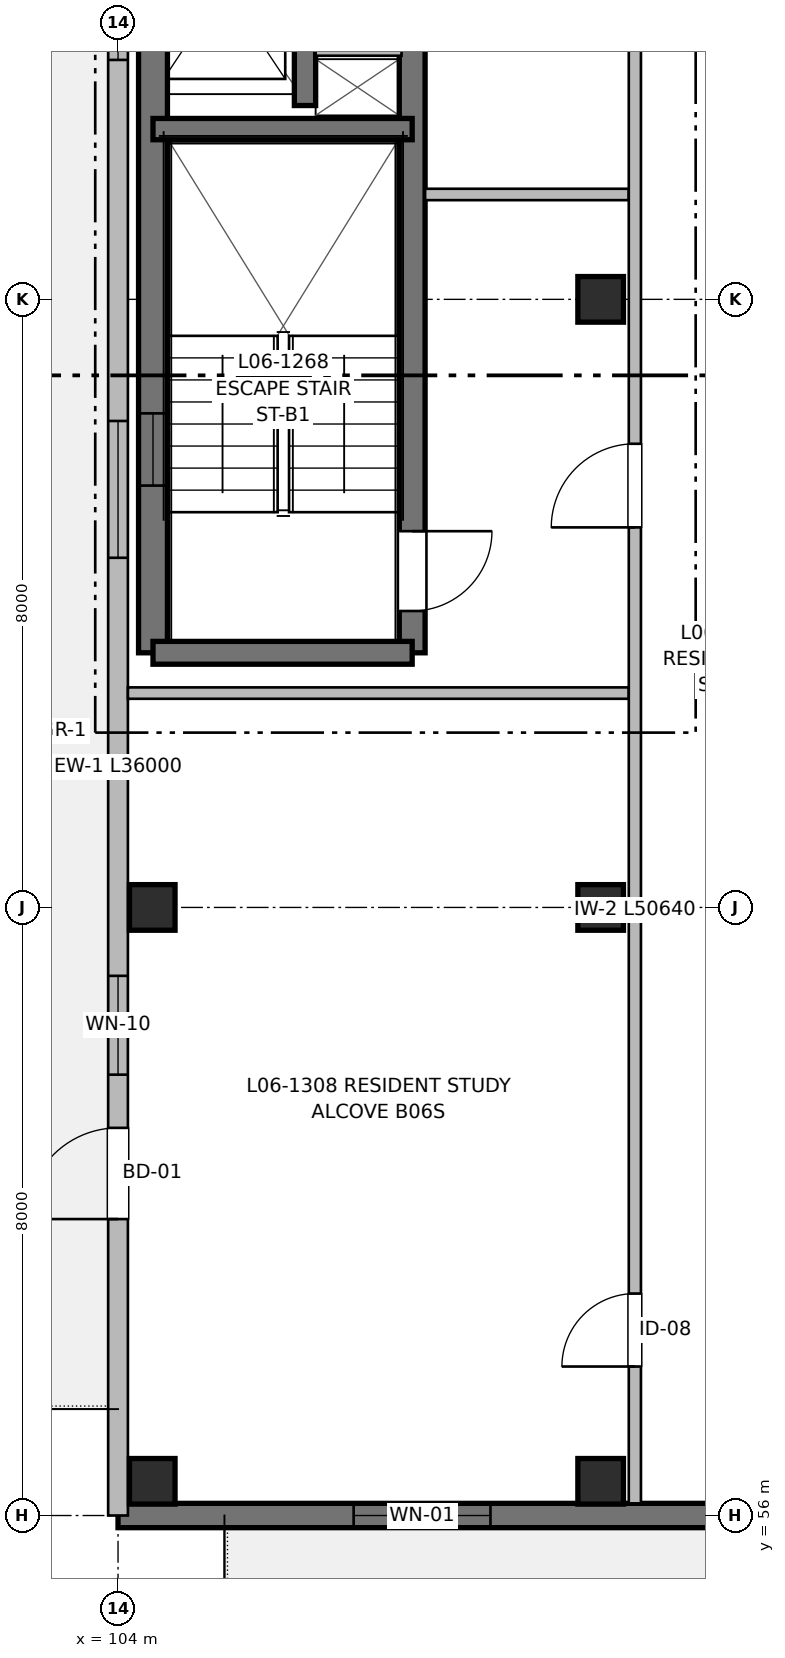
"""IFC4 building model, lengths in metres.
Left out: names, types, materials, properties, quantities, classifications, styles, units other than length and angle.
Written with IfcOpenShell. Run it as: python <this file> out.ifc"""

import sys

from ifc_helpers import new_model, si_unit, direction, frame, frame_2d, origin, origin_2d, place, context, subcontext, project, spatial, rectangle, extrude, element, fill, save


model = new_model("IFC4")
c1 = context("Model", 3, precision=1e-05, world=origin(), true_north=direction((0.0, 1.0)))
c2 = subcontext(c1, "Body", "Model", "MODEL_VIEW")
j1 = project(units=[si_unit("LENGTHUNIT", "METRE"), si_unit("PLANEANGLEUNIT", "RADIAN")], contexts=[c1])
p1 = place(None, origin())
s1 = spatial("IfcSite", under=j1, at=p1, CompositionType="ELEMENT")
p2 = place(p1, origin())
s2 = spatial("IfcBuilding", under=s1, at=p2, CompositionType="ELEMENT")
p3 = place(p2, frame((0.0, 0.0, 20.16)))
s3 = spatial("IfcBuildingStorey", under=s2, at=p3, CompositionType="ELEMENT", Elevation=20.16)
for number, where, z_axis, x_axis in (
    (1, (104.45, 56.45, 0.0), (0.0, 0.0, 1.0), (1.0, 0.0, 0.0)),
    (2, (104.45, 64.0, 0.0), (0.0, 0.0, 1.0), (1.0, 0.0, 0.0)),
    (3, (110.35, 56.45, 0.0), (0.0, 0.0, 1.0), (1.0, 0.0, 0.0)),
    (4, (110.35, 64.0, 0.0), (0.0, 0.0, 1.0), (1.0, 0.0, 0.0)),
    (5, (110.35, 72.0, 0.0), (0.0, 0.0, 1.0), (1.0, 0.0, 0.0)),
):
    element("IfcColumn", number, at=place(p3, frame(where, z_axis=z_axis, x_axis=x_axis)), inside=s3, PredefinedType="COLUMN", context=c2, shape_type="SweptSolid", body=[
        extrude(rectangle(XDim=0.6, YDim=0.6, at=origin_2d()), origin(), (0.0, 0.0, 1.0), 3.2),
    ])
p4 = place(p3, frame((104.46, 67.35, 0.0), z_axis=(0.0, 0.0, 1.0), x_axis=(0.0, 1.0, 0.0)))
e6 = element("IfcWall", 6, at=p4, inside=s3, PredefinedType="SHEAR", context=c2, shape_type="SweptSolid", body=[
    extrude(rectangle(XDim=12.45, YDim=0.38, at=frame_2d((6.225, 0.0))), origin(), (0.0, 0.0, 1.0), 3.2),
])
p5 = place(p4, frame((2.2, 0.0, 0.97)))
e7 = element("IfcOpeningElement", 7, at=p5, cuts=e6, PredefinedType="OPENING", context=c2, shape_type="SweptSolid", body=[
    extrude(rectangle(XDim=0.95, YDim=1.25, at=frame_2d((0.475, 0.625))), frame((0.0, 0.2, 0.0), z_axis=(0.0, -1.0, 0.0), x_axis=(1.0, 0.0, 0.0)), (0.0, 0.0, 1.0), 0.4),
])
p6 = place(p3, frame((107.87, 79.8, 0.0), z_axis=(0.0, 0.0, 1.0), x_axis=(0.0, -1.0, 0.0)))
e8 = element("IfcWall", 8, at=p6, inside=s3, PredefinedType="SHEAR", context=c2, shape_type="SweptSolid", body=[
    extrude(rectangle(XDim=12.45, YDim=0.34, at=frame_2d((6.225, 0.0))), origin(), (0.0, 0.0, 1.0), 3.2),
])
p7 = place(p6, frame((10.85, 0.0, 0.0)))
e9 = element("IfcOpeningElement", 9, at=p7, cuts=e8, PredefinedType="OPENING", context=c2, shape_type="SweptSolid", body=[
    extrude(rectangle(XDim=1.05, YDim=2.15, at=frame_2d((0.525, 1.075))), frame((0.0, 0.18, 0.0), z_axis=(0.0, -1.0, 0.0), x_axis=(1.0, 0.0, 0.0)), (0.0, 0.0, 1.0), 0.36),
])
p8 = place(p3, frame((107.87, 67.35, 0.0), z_axis=(0.0, 0.0, 1.0), x_axis=(-1.0, 0.0, 0.0)))
e10 = element("IfcWall", 10, at=p8, inside=s3, PredefinedType="SHEAR", context=c2, shape_type="SweptSolid", body=[
    extrude(rectangle(XDim=3.41, YDim=0.3, at=frame_2d((1.705, 0.0))), origin(), (0.0, 0.0, 1.0), 3.2),
])
p9 = place(p3, frame((104.46, 74.24, 0.0), z_axis=(0.0, 0.0, 1.0), x_axis=(1.0, 0.0, 0.0)))
e11 = element("IfcWall", 11, at=p9, inside=s3, PredefinedType="SHEAR", context=c2, shape_type="SweptSolid", body=[
    extrude(rectangle(XDim=3.41, YDim=0.28, at=frame_2d((1.705, 0.0))), origin(), (0.0, 0.0, 1.0), 3.2),
])
p10 = place(p3, frame((106.46, 74.55, 0.0), z_axis=(0.0, 0.0, 1.0), x_axis=(0.0, 1.0, 0.0)))
e12 = element("IfcWall", 12, at=p10, inside=s3, PredefinedType="SHEAR", context=c2, shape_type="SweptSolid", body=[
    extrude(rectangle(XDim=5.25, YDim=0.28, at=frame_2d((2.625, 0.0))), origin(), (0.0, 0.0, 1.0), 3.2),
])
p11 = place(p10, frame((1.15, 0.0, 0.0)))
e13 = element("IfcOpeningElement", 13, at=p11, cuts=e12, PredefinedType="OPENING", context=c2, shape_type="SweptSolid", body=[
    extrude(rectangle(XDim=1.0, YDim=2.15, at=frame_2d((0.5, 1.075))), frame((0.0, 0.15, 0.0), z_axis=(0.0, -1.0, 0.0), x_axis=(1.0, 0.0, 0.0)), (0.0, 0.0, 1.0), 0.3),
])
p12 = place(p10, frame((3.85, 0.0, 0.0)))
e14 = element("IfcOpeningElement", 14, at=p12, cuts=e12, PredefinedType="OPENING", context=c2, shape_type="SweptSolid", body=[
    extrude(rectangle(XDim=0.9, YDim=2.15, at=frame_2d((0.45, 1.075))), frame((0.0, 0.15, 0.0), z_axis=(0.0, -1.0, 0.0), x_axis=(1.0, 0.0, 0.0)), (0.0, 0.0, 1.0), 0.3),
])
p13 = place(p3, frame((106.6, 75.28, 0.0), z_axis=(0.0, 0.0, 1.0), x_axis=(1.0, 0.0, 0.0)))
e15 = element("IfcWall", 15, at=p13, inside=s3, PredefinedType="PARTITIONING", context=c2, shape_type="SweptSolid", body=[
    extrude(rectangle(XDim=1.13, YDim=0.15, at=frame_2d((0.565, 0.0))), origin(), (0.0, 0.0, 1.0), 2.95),
])
p14 = place(p3, frame((120.0, 56.0, 0.0), z_axis=(0.0, 0.0, 1.0), x_axis=(-1.0, 0.0, 0.0)))
e16 = element("IfcWall", 16, at=p14, inside=s3, PredefinedType="SHEAR", context=c2, shape_type="SweptSolid", body=[
    extrude(rectangle(XDim=16.0, YDim=0.32, at=frame_2d((8.0, 0.0))), origin(), (0.0, 0.0, 1.0), 2.98),
])
p15 = place(p14, frame((2.55, 0.0, 0.0)))
e17 = element("IfcOpeningElement", 17, at=p15, cuts=e16, PredefinedType="OPENING", context=c2, shape_type="SweptSolid", body=[
    extrude(rectangle(XDim=1.2, YDim=2.2, at=frame_2d((0.6, 1.1))), frame((0.0, 0.17, 0.0), z_axis=(0.0, -1.0, 0.0), x_axis=(1.0, 0.0, 0.0)), (0.0, 0.0, 1.0), 0.34),
])
p16 = place(p14, frame((5.3, 0.0, 0.82)))
e18 = element("IfcOpeningElement", 18, at=p16, cuts=e16, PredefinedType="OPENING", context=c2, shape_type="SweptSolid", body=[
    extrude(rectangle(XDim=1.3, YDim=1.4, at=frame_2d((0.65, 0.7))), frame((0.0, 0.17, 0.0), z_axis=(0.0, -1.0, 0.0), x_axis=(1.0, 0.0, 0.0)), (0.0, 0.0, 1.0), 0.34),
])
p17 = place(p14, frame((11.1, 0.0, 0.72)))
e19 = element("IfcOpeningElement", 19, at=p17, cuts=e16, PredefinedType="OPENING", context=c2, shape_type="SweptSolid", body=[
    extrude(rectangle(XDim=1.8, YDim=1.5, at=frame_2d((0.9, 0.75))), frame((0.0, 0.17, 0.0), z_axis=(0.0, -1.0, 0.0), x_axis=(1.0, 0.0, 0.0)), (0.0, 0.0, 1.0), 0.34),
])
p18 = place(p3, frame((104.0, 56.0, 0.0), z_axis=(0.0, 0.0, 1.0), x_axis=(0.0, 1.0, 0.0)))
e20 = element("IfcWall", 20, at=p18, inside=s3, PredefinedType="SOLIDWALL", context=c2, shape_type="SweptSolid", body=[
    extrude(rectangle(XDim=36.0, YDim=0.26, at=frame_2d((18.0, 0.0))), origin(), (0.0, 0.0, 1.0), 2.98),
])
p19 = place(p18, frame((3.9, 0.0, 0.0)))
e21 = element("IfcOpeningElement", 21, at=p19, cuts=e20, PredefinedType="OPENING", context=c2, shape_type="SweptSolid", body=[
    extrude(rectangle(XDim=1.2, YDim=2.2, at=frame_2d((0.6, 1.1))), frame((0.0, 0.14, 0.0), z_axis=(0.0, -1.0, 0.0), x_axis=(1.0, 0.0, 0.0)), (0.0, 0.0, 1.0), 0.28),
])
p20 = place(p18, frame((5.8, 0.0, 0.82)))
e22 = element("IfcOpeningElement", 22, at=p20, cuts=e20, PredefinedType="OPENING", context=c2, shape_type="SweptSolid", body=[
    extrude(rectangle(XDim=1.3, YDim=1.4, at=frame_2d((0.65, 0.7))), frame((0.0, 0.14, 0.0), z_axis=(0.0, -1.0, 0.0), x_axis=(1.0, 0.0, 0.0)), (0.0, 0.0, 1.0), 0.28),
])
p21 = place(p18, frame((12.6, 0.0, 0.72)))
e23 = element("IfcOpeningElement", 23, at=p21, cuts=e20, PredefinedType="OPENING", context=c2, shape_type="SweptSolid", body=[
    extrude(rectangle(XDim=1.8, YDim=1.5, at=frame_2d((0.9, 0.75))), frame((0.0, 0.14, 0.0), z_axis=(0.0, -1.0, 0.0), x_axis=(1.0, 0.0, 0.0)), (0.0, 0.0, 1.0), 0.28),
])
p22 = place(p18, frame((19.15, 0.0, 0.72)))
e24 = element("IfcOpeningElement", 24, at=p22, cuts=e20, PredefinedType="OPENING", context=c2, shape_type="SweptSolid", body=[
    extrude(rectangle(XDim=2.0, YDim=1.5, at=frame_2d((1.0, 0.75))), frame((0.0, 0.14, 0.0), z_axis=(0.0, -1.0, 0.0), x_axis=(1.0, 0.0, 0.0)), (0.0, 0.0, 1.0), 0.28),
])
p23 = place(p18, frame((30.675, 0.0, 0.77)))
e25 = element("IfcOpeningElement", 25, at=p23, cuts=e20, PredefinedType="OPENING", context=c2, shape_type="SweptSolid", body=[
    extrude(rectangle(XDim=1.65, YDim=1.45, at=frame_2d((0.825, 0.725))), frame((0.0, 0.14, 0.0), z_axis=(0.0, -1.0, 0.0), x_axis=(1.0, 0.0, 0.0)), (0.0, 0.0, 1.0), 0.28),
])
p24 = place(p3, frame((104.13, 66.82, 0.0), z_axis=(0.0, 0.0, 1.0), x_axis=(1.0, 0.0, 0.0)))
e26 = element("IfcWall", 26, at=p24, inside=s3, PredefinedType="PARTITIONING", context=c2, shape_type="SweptSolid", body=[
    extrude(rectangle(XDim=6.59, YDim=0.15, at=frame_2d((3.295, 0.0))), origin(), (0.0, 0.0, 1.0), 2.935),
])
p25 = place(p3, frame((108.04, 73.38, 0.0), z_axis=(0.0, 0.0, 1.0), x_axis=(1.0, 0.0, 0.0)))
e27 = element("IfcWall", 27, at=p25, inside=s3, PredefinedType="PARTITIONING", context=c2, shape_type="SweptSolid", body=[
    extrude(rectangle(XDim=2.68, YDim=0.15, at=frame_2d((1.34, 0.0))), origin(), (0.0, 0.0, 1.0), 2.935),
])
p26 = place(p3, frame((110.8, 56.16, 0.0), z_axis=(0.0, 0.0, 1.0), x_axis=(0.0, 1.0, 0.0)))
e28 = element("IfcWall", 28, at=p26, inside=s3, PredefinedType="PARTITIONING", context=c2, shape_type="SweptSolid", body=[
    extrude(rectangle(XDim=50.64, YDim=0.16, at=frame_2d((25.32, 0.0))), origin(), (0.0, 0.0, 1.0), 2.935),
])
p27 = place(p26, frame((12.84, 0.0, 0.0)))
e29 = element("IfcOpeningElement", 29, at=p27, cuts=e28, PredefinedType="OPENING", context=c2, shape_type="SweptSolid", body=[
    extrude(rectangle(XDim=1.1, YDim=2.15, at=frame_2d((0.55, 1.075))), frame((0.0, 0.09, 0.0), z_axis=(0.0, -1.0, 0.0), x_axis=(1.0, 0.0, 0.0)), (0.0, 0.0, 1.0), 0.18),
])
p28 = place(p26, frame((19.24, 0.0, 0.0)))
e30 = element("IfcOpeningElement", 30, at=p28, cuts=e28, PredefinedType="OPENING", context=c2, shape_type="SweptSolid", body=[
    extrude(rectangle(XDim=1.6, YDim=2.15, at=frame_2d((0.8, 1.075))), frame((0.0, 0.09, 0.0), z_axis=(0.0, -1.0, 0.0), x_axis=(1.0, 0.0, 0.0)), (0.0, 0.0, 1.0), 0.18),
])
p29 = place(p26, frame((1.8, 0.0, 0.0)))
e31 = element("IfcOpeningElement", 31, at=p29, cuts=e28, PredefinedType="OPENING", context=c2, shape_type="SweptSolid", body=[
    extrude(rectangle(XDim=0.96, YDim=2.15, at=frame_2d((0.48, 1.075))), frame((0.0, 0.09, 0.0), z_axis=(0.0, -1.0, 0.0), x_axis=(1.0, 0.0, 0.0)), (0.0, 0.0, 1.0), 0.18),
])
p30 = place(p26, frame((32.845, 0.0, 0.0)))
e32 = element("IfcOpeningElement", 32, at=p30, cuts=e28, PredefinedType="OPENING", context=c2, shape_type="SweptSolid", body=[
    extrude(rectangle(XDim=0.98, YDim=2.15, at=frame_2d((0.49, 1.075))), frame((0.0, 0.09, 0.0), z_axis=(0.0, -1.0, 0.0), x_axis=(1.0, 0.0, 0.0)), (0.0, 0.0, 1.0), 0.18),
])
p31 = place(p26, frame((40.655, 0.0, 0.0)))
e33 = element("IfcOpeningElement", 33, at=p31, cuts=e28, PredefinedType="OPENING", context=c2, shape_type="SweptSolid", body=[
    extrude(rectangle(XDim=0.98, YDim=2.15, at=frame_2d((0.49, 1.075))), frame((0.0, 0.09, 0.0), z_axis=(0.0, -1.0, 0.0), x_axis=(1.0, 0.0, 0.0)), (0.0, 0.0, 1.0), 0.18),
])
p32 = place(p7, origin())
e34 = element("IfcDoor", 34, at=p32, inside=s3, OperationType="SINGLE_SWING_LEFT", PredefinedType="DOOR", context=c2, shape_type="SweptSolid", body=[
    extrude(rectangle(XDim=1.05, YDim=2.15, at=frame_2d((0.525, 1.075))), frame((0.0, 0.025, 0.0), z_axis=(0.0, -1.0, 0.0), x_axis=(1.0, 0.0, 0.0)), (0.0, 0.0, 1.0), 0.05),
])
fill(e9, e34)
p33 = place(p5, origin())
e35 = element("IfcWindow", 35, at=p33, inside=s3, PartitioningType="SINGLE_PANEL", PredefinedType="WINDOW", context=c2, shape_type="SweptSolid", body=[
    extrude(rectangle(XDim=0.95, YDim=1.25, at=frame_2d((0.475, 0.625))), frame((0.0, 0.03, 0.0), z_axis=(0.0, -1.0, 0.0), x_axis=(1.0, 0.0, 0.0)), (0.0, 0.0, 1.0), 0.06),
])
fill(e7, e35)
p34 = place(p17, origin())
e36 = element("IfcWindow", 36, at=p34, inside=s3, PartitioningType="SINGLE_PANEL", PredefinedType="WINDOW", context=c2, shape_type="SweptSolid", body=[
    extrude(rectangle(XDim=1.8, YDim=1.5, at=frame_2d((0.9, 0.75))), frame((0.0, 0.03, 0.0), z_axis=(0.0, -1.0, 0.0), x_axis=(1.0, 0.0, 0.0)), (0.0, 0.0, 1.0), 0.06),
])
fill(e19, e36)
p35 = place(p19, origin())
e37 = element("IfcDoor", 37, at=p35, inside=s3, OperationType="SINGLE_SWING_LEFT", PredefinedType="DOOR", context=c2, shape_type="SweptSolid", body=[
    extrude(rectangle(XDim=1.2, YDim=2.2, at=frame_2d((0.6, 1.1))), frame((0.0, 0.025, 0.0), z_axis=(0.0, -1.0, 0.0), x_axis=(1.0, 0.0, 0.0)), (0.0, 0.0, 1.0), 0.05),
])
fill(e21, e37)
p36 = place(p20, origin())
e38 = element("IfcWindow", 38, at=p36, inside=s3, PartitioningType="SINGLE_PANEL", PredefinedType="WINDOW", context=c2, shape_type="SweptSolid", body=[
    extrude(rectangle(XDim=1.3, YDim=1.4, at=frame_2d((0.65, 0.7))), frame((0.0, 0.03, 0.0), z_axis=(0.0, -1.0, 0.0), x_axis=(1.0, 0.0, 0.0)), (0.0, 0.0, 1.0), 0.06),
])
fill(e22, e38)
p37 = place(p21, origin())
e39 = element("IfcWindow", 39, at=p37, inside=s3, PartitioningType="SINGLE_PANEL", PredefinedType="WINDOW", context=c2, shape_type="SweptSolid", body=[
    extrude(rectangle(XDim=1.8, YDim=1.5, at=frame_2d((0.9, 0.75))), frame((0.0, 0.03, 0.0), z_axis=(0.0, -1.0, 0.0), x_axis=(1.0, 0.0, 0.0)), (0.0, 0.0, 1.0), 0.06),
])
fill(e23, e39)
p38 = place(p22, origin())
e40 = element("IfcWindow", 40, at=p38, inside=s3, PartitioningType="SINGLE_PANEL", PredefinedType="WINDOW", context=c2, shape_type="SweptSolid", body=[
    extrude(rectangle(XDim=2.0, YDim=1.5, at=frame_2d((1.0, 0.75))), frame((0.0, 0.03, 0.0), z_axis=(0.0, -1.0, 0.0), x_axis=(1.0, 0.0, 0.0)), (0.0, 0.0, 1.0), 0.06),
])
fill(e24, e40)
p39 = place(p27, origin())
e41 = element("IfcDoor", 41, at=p39, inside=s3, OperationType="SINGLE_SWING_LEFT", PredefinedType="DOOR", context=c2, shape_type="SweptSolid", body=[
    extrude(rectangle(XDim=1.1, YDim=2.15, at=frame_2d((0.55, 1.075))), frame((0.0, 0.025, 0.0), z_axis=(0.0, -1.0, 0.0), x_axis=(1.0, 0.0, 0.0)), (0.0, 0.0, 1.0), 0.05),
])
fill(e29, e41)
p40 = place(p29, origin())
e42 = element("IfcDoor", 42, at=p40, inside=s3, OperationType="SINGLE_SWING_LEFT", PredefinedType="DOOR", context=c2, shape_type="SweptSolid", body=[
    extrude(rectangle(XDim=0.96, YDim=2.15, at=frame_2d((0.48, 1.075))), frame((0.0, 0.025, 0.0), z_axis=(0.0, -1.0, 0.0), x_axis=(1.0, 0.0, 0.0)), (0.0, 0.0, 1.0), 0.05),
])
fill(e31, e42)
save(model, sys.argv[1])
